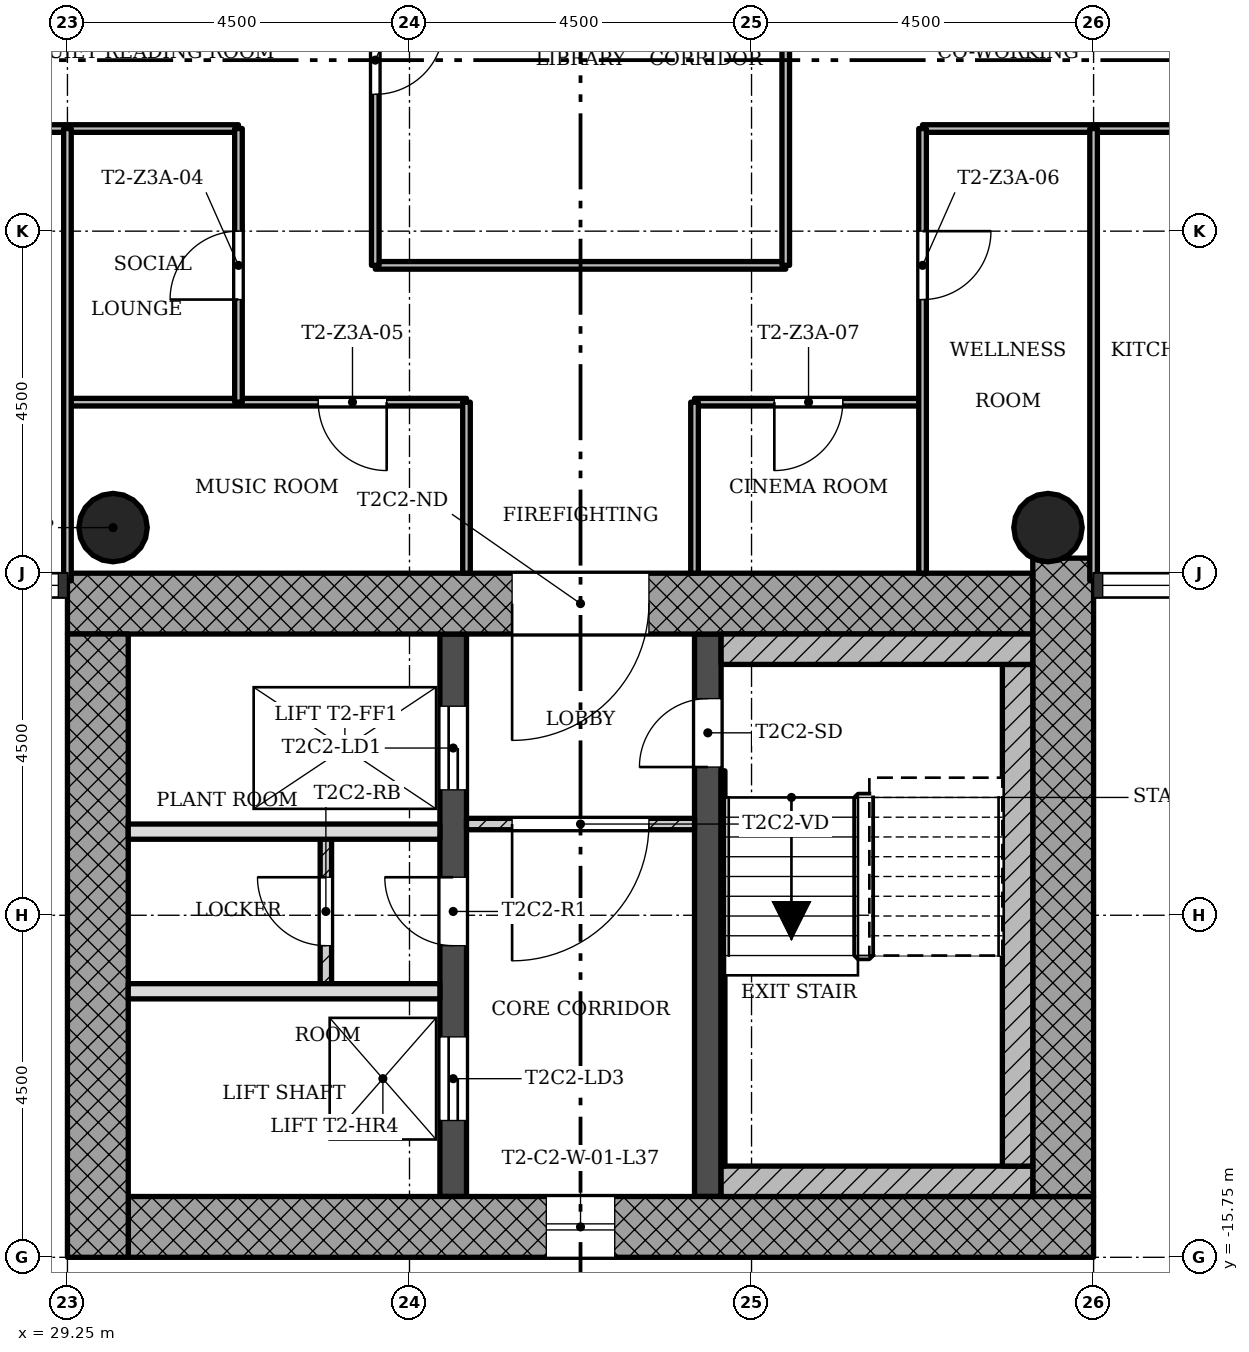
"""IFC4 building model, lengths in metres.
Left out: names, types, materials, properties, quantities, classifications, styles, units other than length and angle.
Written with IfcOpenShell. Run it as: python <this file> out.ifc"""

import sys

from ifc_helpers import new_model, si_unit, direction, frame, frame_2d, origin, origin_2d, place, context, subcontext, project, spatial, rectangle, hollow_circle, extrude, element, fill, save


model = new_model("IFC4")
c1 = context("Model", 3, precision=1e-05, world=origin(), true_north=direction((0.0, 1.0)))
c2 = subcontext(c1, "Body", "Model", "MODEL_VIEW")
j1 = project(units=[si_unit("LENGTHUNIT", "METRE"), si_unit("PLANEANGLEUNIT", "RADIAN")], contexts=[c1])
p1 = place(None, origin())
s1 = spatial("IfcSite", under=j1, at=p1, CompositionType="ELEMENT")
p2 = place(p1, origin())
s2 = spatial("IfcBuilding", under=s1, at=p2, CompositionType="ELEMENT")
p3 = place(p2, frame((0.0, 0.0, 137.1)))
s3 = spatial("IfcBuildingStorey", under=s2, at=p3, CompositionType="ELEMENT", Elevation=137.1)
p4 = place(p3, frame((30.05, -15.35, 0.0), z_axis=(0.0, 0.0, 1.0), x_axis=(1.0, 0.0, 0.0)))
e1 = element("IfcWall", 1, at=p4, inside=s3, PredefinedType="SHEAR", context=c2, shape_type="SweptSolid", body=[
    extrude(rectangle(XDim=12.7, YDim=0.8, at=frame_2d((6.35, 0.0))), origin(), (0.0, 0.0, 1.0), 3.4),
])
p5 = place(p4, frame((5.5, 0.0, 0.45)))
e2 = element("IfcOpeningElement", 2, at=p5, cuts=e1, PredefinedType="OPENING", context=c2, shape_type="SweptSolid", body=[
    extrude(rectangle(XDim=0.9, YDim=2.4, at=frame_2d((0.45, 1.2))), frame((0.0, 0.41, 0.0), z_axis=(0.0, -1.0, 0.0), x_axis=(1.0, 0.0, 0.0)), (0.0, 0.0, 1.0), 0.82),
])
p6 = place(p3, frame((42.35, -14.95, 0.0), z_axis=(0.0, 0.0, 1.0), x_axis=(0.0, 1.0, 0.0)))
e3 = element("IfcWall", 3, at=p6, inside=s3, PredefinedType="SHEAR", context=c2, shape_type="SweptSolid", body=[
    extrude(rectangle(XDim=8.398, YDim=0.8, at=frame_2d((4.199, 0.0))), origin(), (0.0, 0.0, 1.0), 3.4),
])
p7 = place(p3, frame((41.95, -7.15, 0.0), z_axis=(0.0, 0.0, 1.0), x_axis=(-1.0, 0.0, 0.0)))
e4 = element("IfcWall", 4, at=p7, inside=s3, PredefinedType="SHEAR", context=c2, shape_type="SweptSolid", body=[
    extrude(rectangle(XDim=12.7, YDim=0.8, at=frame_2d((6.35, 0.0))), origin(), (0.0, 0.0, 1.0), 3.4),
])
p8 = place(p7, frame((5.05, 0.0, 0.0)))
e5 = element("IfcOpeningElement", 5, at=p8, cuts=e4, PredefinedType="OPENING", context=c2, shape_type="SweptSolid", body=[
    extrude(rectangle(XDim=1.8, YDim=2.1, at=frame_2d((0.9, 1.05))), frame((0.0, 0.41, 0.0), z_axis=(0.0, -1.0, 0.0), x_axis=(1.0, 0.0, 0.0)), (0.0, 0.0, 1.0), 0.82),
])
p9 = place(p3, frame((29.65, -7.55, 0.0), z_axis=(0.0, 0.0, 1.0), x_axis=(0.0, -1.0, 0.0)))
e6 = element("IfcWall", 6, at=p9, inside=s3, PredefinedType="SHEAR", context=c2, shape_type="SweptSolid", body=[
    extrude(rectangle(XDim=8.2, YDim=0.8, at=frame_2d((4.1, 0.0))), origin(), (0.0, 0.0, 1.0), 3.4),
])
p10 = place(p3, frame((34.325, -14.95, 0.0), z_axis=(0.0, 0.0, 1.0), x_axis=(0.0, 1.0, 0.0)))
e7 = element("IfcWall", 7, at=p10, inside=s3, PredefinedType="SHEAR", context=c2, shape_type="SweptSolid", body=[
    extrude(rectangle(XDim=7.4, YDim=0.35, at=frame_2d((3.7, 0.0))), origin(), (0.0, 0.0, 1.0), 3.4),
])
p11 = place(p10, frame((5.35, 0.0, 0.0)))
e8 = element("IfcOpeningElement", 8, at=p11, cuts=e7, PredefinedType="OPENING", context=c2, shape_type="SweptSolid", body=[
    extrude(rectangle(XDim=1.1, YDim=2.1, at=frame_2d((0.55, 1.05))), frame((0.0, 0.185, 0.0), z_axis=(0.0, -1.0, 0.0), x_axis=(1.0, 0.0, 0.0)), (0.0, 0.0, 1.0), 0.37),
])
p12 = place(p10, frame((1.0, 0.0, 0.0)))
e9 = element("IfcOpeningElement", 9, at=p12, cuts=e7, PredefinedType="OPENING", context=c2, shape_type="SweptSolid", body=[
    extrude(rectangle(XDim=1.1, YDim=2.1, at=frame_2d((0.55, 1.05))), frame((0.0, 0.185, 0.0), z_axis=(0.0, -1.0, 0.0), x_axis=(1.0, 0.0, 0.0)), (0.0, 0.0, 1.0), 0.37),
])
p13 = place(p10, frame((3.3, 0.0, 0.0)))
e10 = element("IfcOpeningElement", 10, at=p13, cuts=e7, PredefinedType="OPENING", context=c2, shape_type="SweptSolid", body=[
    extrude(rectangle(XDim=0.9, YDim=2.1, at=frame_2d((0.45, 1.05))), frame((0.0, 0.185, 0.0), z_axis=(0.0, -1.0, 0.0), x_axis=(1.0, 0.0, 0.0)), (0.0, 0.0, 1.0), 0.37),
])
p14 = place(p3, frame((37.675, -14.95, 0.0), z_axis=(0.0, 0.0, 1.0), x_axis=(0.0, 1.0, 0.0)))
e11 = element("IfcWall", 11, at=p14, inside=s3, PredefinedType="SHEAR", context=c2, shape_type="SweptSolid", body=[
    extrude(rectangle(XDim=7.4, YDim=0.35, at=frame_2d((3.7, 0.0))), origin(), (0.0, 0.0, 1.0), 3.4),
])
p15 = place(p14, frame((5.65, 0.0, 0.0)))
e12 = element("IfcOpeningElement", 12, at=p15, cuts=e11, PredefinedType="OPENING", context=c2, shape_type="SweptSolid", body=[
    extrude(rectangle(XDim=0.9, YDim=2.1, at=frame_2d((0.45, 1.05))), frame((0.0, 0.185, 0.0), z_axis=(0.0, -1.0, 0.0), x_axis=(1.0, 0.0, 0.0)), (0.0, 0.0, 1.0), 0.37),
])
for number, where, z_axis, x_axis in (
    (13, (42.15, -6.15, 0.0), (0.0, 0.0, 1.0), (1.0, 0.0, 0.0)),
    (14, (29.85, -6.15, 0.0), (0.0, 0.0, 1.0), (1.0, 0.0, 0.0)),
):
    element("IfcColumn", number, at=place(p3, frame(where, z_axis=z_axis, x_axis=x_axis)), inside=s3, PredefinedType="COLUMN", context=c2, shape_type="SweptSolid", body=[
        extrude(hollow_circle(Radius=0.45, WallThickness=0.032, at=origin_2d()), origin(), (0.0, 0.0, 1.0), 3.4),
    ])
p16 = place(p3, frame((34.5, -10.05, 0.0), z_axis=(0.0, 0.0, 1.0), x_axis=(1.0, 0.0, 0.0)))
e15 = element("IfcWall", 15, at=p16, inside=s3, PredefinedType="PARTITIONING", context=c2, shape_type="SweptSolid", body=[
    extrude(rectangle(XDim=3.0, YDim=0.15, at=frame_2d((1.5, 0.0))), origin(), (0.0, 0.0, 1.0), 3.0),
])
p17 = place(p16, frame((0.6, 0.0, 0.0)))
e16 = element("IfcOpeningElement", 16, at=p17, cuts=e15, PredefinedType="OPENING", context=c2, shape_type="SweptSolid", body=[
    extrude(rectangle(XDim=1.8, YDim=2.1, at=frame_2d((0.9, 1.05))), frame((0.0, 0.085, 0.0), z_axis=(0.0, -1.0, 0.0), x_axis=(1.0, 0.0, 0.0)), (0.0, 0.0, 1.0), 0.17),
])
for number, where, z_axis, x_axis in (
    (17, (30.05, -12.25, 0.0), (0.0, 0.0, 1.0), (1.0, 0.0, 0.0)),
    (18, (30.05, -10.15, 0.0), (0.0, 0.0, 1.0), (1.0, 0.0, 0.0)),
):
    element("IfcWall", number, at=place(p3, frame(where, z_axis=z_axis, x_axis=x_axis)), inside=s3, PredefinedType="SOLIDWALL", context=c2, shape_type="SweptSolid", body=[
        extrude(rectangle(XDim=4.1, YDim=0.2, at=frame_2d((2.05, 0.0))), origin(), (0.0, 0.0, 1.0), 3.0),
    ])
p18 = place(p3, frame((32.65, -10.15, 0.0), z_axis=(0.0, 0.0, 1.0), x_axis=(0.0, -1.0, 0.0)))
e19 = element("IfcWall", 19, at=p18, inside=s3, PredefinedType="PARTITIONING", context=c2, shape_type="SweptSolid", body=[
    extrude(rectangle(XDim=2.1, YDim=0.15, at=frame_2d((1.05, 0.0))), origin(), (0.0, 0.0, 1.0), 3.0),
])
p19 = place(p18, frame((0.6, 0.0, 0.0)))
e20 = element("IfcOpeningElement", 20, at=p19, cuts=e19, PredefinedType="OPENING", context=c2, shape_type="SweptSolid", body=[
    extrude(rectangle(XDim=0.9, YDim=2.1, at=frame_2d((0.45, 1.05))), frame((0.0, 0.085, 0.0), z_axis=(0.0, -1.0, 0.0), x_axis=(1.0, 0.0, 0.0)), (0.0, 0.0, 1.0), 0.17),
])
p20 = place(p3, frame((40.5, -4.5, 0.0), z_axis=(0.0, 0.0, 1.0), x_axis=(-1.0, 0.0, 0.0)))
e21 = element("IfcWall", 21, at=p20, inside=s3, PredefinedType="PARTITIONING", context=c2, shape_type="SweptSolid", body=[
    extrude(rectangle(XDim=3.0, YDim=0.1, at=frame_2d((1.5, 0.0))), origin(), (0.0, 0.0, 1.0), 3.0),
])
p21 = place(p20, frame((1.05, 0.0, 0.0)))
e22 = element("IfcOpeningElement", 22, at=p21, cuts=e21, PredefinedType="OPENING", context=c2, shape_type="SweptSolid", body=[
    extrude(rectangle(XDim=0.9, YDim=2.1, at=frame_2d((0.45, 1.05))), frame((0.0, 0.06, 0.0), z_axis=(0.0, -1.0, 0.0), x_axis=(1.0, 0.0, 0.0)), (0.0, 0.0, 1.0), 0.12),
])
p22 = place(p3, frame((34.5, -4.5, 0.0), z_axis=(0.0, 0.0, 1.0), x_axis=(-1.0, 0.0, 0.0)))
e23 = element("IfcWall", 23, at=p22, inside=s3, PredefinedType="PARTITIONING", context=c2, shape_type="SweptSolid", body=[
    extrude(rectangle(XDim=5.25, YDim=0.1, at=frame_2d((2.625, 0.0))), origin(), (0.0, 0.0, 1.0), 3.0),
])
p23 = place(p22, frame((1.05, 0.0, 0.0)))
e24 = element("IfcOpeningElement", 24, at=p23, cuts=e23, PredefinedType="OPENING", context=c2, shape_type="SweptSolid", body=[
    extrude(rectangle(XDim=0.9, YDim=2.1, at=frame_2d((0.45, 1.05))), frame((0.0, 0.06, 0.0), z_axis=(0.0, -1.0, 0.0), x_axis=(1.0, 0.0, 0.0)), (0.0, 0.0, 1.0), 0.12),
])
p24 = place(p3, frame((38.7, -2.7, 0.0), z_axis=(0.0, 0.0, 1.0), x_axis=(-1.0, 0.0, 0.0)))
e25 = element("IfcWall", 25, at=p24, inside=s3, PredefinedType="PARTITIONING", context=c2, shape_type="SweptSolid", body=[
    extrude(rectangle(XDim=5.4, YDim=0.1, at=frame_2d((2.7, 0.0))), origin(), (0.0, 0.0, 1.0), 3.0),
])
p25 = place(p3, frame((47.25, -0.9, 0.0), z_axis=(0.0, 0.0, 1.0), x_axis=(-1.0, 0.0, 0.0)))
e26 = element("IfcWall", 26, at=p25, inside=s3, PredefinedType="PARTITIONING", context=c2, shape_type="SweptSolid", body=[
    extrude(rectangle(XDim=6.75, YDim=0.1, at=frame_2d((3.375, 0.0))), origin(), (0.0, 0.0, 1.0), 3.0),
])
p26 = place(p25, frame((1.8, 0.0, 0.0)))
e27 = element("IfcOpeningElement", 27, at=p26, cuts=e26, PredefinedType="OPENING", context=c2, shape_type="SweptSolid", body=[
    extrude(rectangle(XDim=0.9, YDim=2.1, at=frame_2d((0.45, 1.05))), frame((0.0, 0.06, 0.0), z_axis=(0.0, -1.0, 0.0), x_axis=(1.0, 0.0, 0.0)), (0.0, 0.0, 1.0), 0.12),
])
p27 = place(p3, frame((31.5, -0.9, 0.0), z_axis=(0.0, 0.0, 1.0), x_axis=(-1.0, 0.0, 0.0)))
e28 = element("IfcWall", 28, at=p27, inside=s3, PredefinedType="PARTITIONING", context=c2, shape_type="SweptSolid", body=[
    extrude(rectangle(XDim=4.05, YDim=0.1, at=frame_2d((2.025, 0.0))), origin(), (0.0, 0.0, 1.0), 3.0),
])
p28 = place(p3, frame((42.75, -6.85, 0.0), z_axis=(0.0, 0.0, 1.0), x_axis=(0.0, 1.0, 0.0)))
e29 = element("IfcWall", 29, at=p28, inside=s3, PredefinedType="PARTITIONING", context=c2, shape_type="SweptSolid", body=[
    extrude(rectangle(XDim=5.95, YDim=0.1, at=frame_2d((2.975, 0.0))), origin(), (0.0, 0.0, 1.0), 3.0),
])
p29 = place(p3, frame((40.5, -6.75, 0.0), z_axis=(0.0, 0.0, 1.0), x_axis=(0.0, 1.0, 0.0)))
e30 = element("IfcWall", 30, at=p29, inside=s3, PredefinedType="PARTITIONING", context=c2, shape_type="SweptSolid", body=[
    extrude(rectangle(XDim=5.85, YDim=0.1, at=frame_2d((2.925, 0.0))), origin(), (0.0, 0.0, 1.0), 3.0),
])
p30 = place(p29, frame((3.6, 0.0, 0.0)))
e31 = element("IfcOpeningElement", 31, at=p30, cuts=e30, PredefinedType="OPENING", context=c2, shape_type="SweptSolid", body=[
    extrude(rectangle(XDim=0.9, YDim=2.1, at=frame_2d((0.45, 1.05))), frame((0.0, 0.06, 0.0), z_axis=(0.0, -1.0, 0.0), x_axis=(1.0, 0.0, 0.0)), (0.0, 0.0, 1.0), 0.12),
])
p31 = place(p3, frame((38.7, -2.7, 0.0), z_axis=(0.0, 0.0, 1.0), x_axis=(0.0, 1.0, 0.0)))
e32 = element("IfcWall", 32, at=p31, inside=s3, PredefinedType="PARTITIONING", context=c2, shape_type="SweptSolid", body=[
    extrude(rectangle(XDim=5.4, YDim=0.1, at=frame_2d((2.7, 0.0))), origin(), (0.0, 0.0, 1.0), 3.0),
])
for number, where, z_axis, x_axis in (
    (33, (37.5, -6.75, 0.0), (0.0, 0.0, 1.0), (0.0, 1.0, 0.0)),
    (34, (34.5, -6.75, 0.0), (0.0, 0.0, 1.0), (0.0, 1.0, 0.0)),
):
    element("IfcWall", number, at=place(p3, frame(where, z_axis=z_axis, x_axis=x_axis)), inside=s3, PredefinedType="PARTITIONING", context=c2, shape_type="SweptSolid", body=[
        extrude(rectangle(XDim=2.25, YDim=0.1, at=frame_2d((1.125, 0.0))), origin(), (0.0, 0.0, 1.0), 3.0),
    ])
p32 = place(p3, frame((33.3, -2.7, 0.0), z_axis=(0.0, 0.0, 1.0), x_axis=(0.0, 1.0, 0.0)))
e35 = element("IfcWall", 35, at=p32, inside=s3, PredefinedType="PARTITIONING", context=c2, shape_type="SweptSolid", body=[
    extrude(rectangle(XDim=5.4, YDim=0.1, at=frame_2d((2.7, 0.0))), origin(), (0.0, 0.0, 1.0), 3.0),
])
p33 = place(p32, frame((2.25, 0.0, 0.0)))
e36 = element("IfcOpeningElement", 36, at=p33, cuts=e35, PredefinedType="OPENING", context=c2, shape_type="SweptSolid", body=[
    extrude(rectangle(XDim=0.9, YDim=2.1, at=frame_2d((0.45, 1.05))), frame((0.0, 0.06, 0.0), z_axis=(0.0, -1.0, 0.0), x_axis=(1.0, 0.0, 0.0)), (0.0, 0.0, 1.0), 0.12),
])
p34 = place(p3, frame((31.5, -4.5, 0.0), z_axis=(0.0, 0.0, 1.0), x_axis=(0.0, 1.0, 0.0)))
e37 = element("IfcWall", 37, at=p34, inside=s3, PredefinedType="PARTITIONING", context=c2, shape_type="SweptSolid", body=[
    extrude(rectangle(XDim=3.6, YDim=0.1, at=frame_2d((1.8, 0.0))), origin(), (0.0, 0.0, 1.0), 3.0),
])
p35 = place(p34, frame((1.35, 0.0, 0.0)))
e38 = element("IfcOpeningElement", 38, at=p35, cuts=e37, PredefinedType="OPENING", context=c2, shape_type="SweptSolid", body=[
    extrude(rectangle(XDim=0.9, YDim=2.1, at=frame_2d((0.45, 1.05))), frame((0.0, 0.06, 0.0), z_axis=(0.0, -1.0, 0.0), x_axis=(1.0, 0.0, 0.0)), (0.0, 0.0, 1.0), 0.12),
])
p36 = place(p3, frame((29.25, -6.85, 0.0), z_axis=(0.0, 0.0, 1.0), x_axis=(0.0, 1.0, 0.0)))
e39 = element("IfcWall", 39, at=p36, inside=s3, PredefinedType="PARTITIONING", context=c2, shape_type="SweptSolid", body=[
    extrude(rectangle(XDim=5.95, YDim=0.1, at=frame_2d((2.975, 0.0))), origin(), (0.0, 0.0, 1.0), 3.0),
])
p37 = place(p3, frame((37.85, -14.75, 0.0), z_axis=(0.0, 0.0, 1.0), x_axis=(1.0, 0.0, 0.0)))
e40 = element("IfcWall", 40, at=p37, inside=s3, PredefinedType="SHEAR", context=c2, shape_type="SweptSolid", body=[
    extrude(rectangle(XDim=4.1, YDim=0.4, at=frame_2d((2.05, 0.0))), origin(), (0.0, 0.0, 1.0), 3.4),
])
p38 = place(p3, frame((41.75, -7.95, 0.0), z_axis=(0.0, 0.0, 1.0), x_axis=(0.0, -1.0, 0.0)))
e41 = element("IfcWall", 41, at=p38, inside=s3, PredefinedType="SHEAR", context=c2, shape_type="SweptSolid", body=[
    extrude(rectangle(XDim=6.6, YDim=0.4, at=frame_2d((3.3, 0.0))), origin(), (0.0, 0.0, 1.0), 3.4),
])
p39 = place(p3, frame((37.85, -7.75, 0.0), z_axis=(0.0, 0.0, 1.0), x_axis=(1.0, 0.0, 0.0)))
e42 = element("IfcWall", 42, at=p39, inside=s3, PredefinedType="SHEAR", context=c2, shape_type="SweptSolid", body=[
    extrude(rectangle(XDim=4.1, YDim=0.4, at=frame_2d((2.05, 0.0))), origin(), (0.0, 0.0, 1.0), 3.4),
])
p40 = place(p3, frame((37.875, -9.35, 0.0), z_axis=(0.0, 0.0, 1.0), x_axis=(0.0, -1.0, 0.0)))
e43 = element("IfcWall", 43, at=p40, inside=s3, PredefinedType="SHEAR", context=c2, shape_type="SweptSolid", body=[
    extrude(rectangle(XDim=5.2, YDim=0.05, at=frame_2d((2.6, 0.0))), origin(), (0.0, 0.0, 1.0), 3.4),
])
p41 = place(p5, origin())
e44 = element("IfcWindow", 44, at=p41, inside=s3, PartitioningType="SINGLE_PANEL", PredefinedType="WINDOW", context=c2, shape_type="SweptSolid", body=[
    extrude(rectangle(XDim=0.9, YDim=2.4, at=frame_2d((0.45, 1.2))), frame((0.0, 0.03, 0.0), z_axis=(0.0, -1.0, 0.0), x_axis=(1.0, 0.0, 0.0)), (0.0, 0.0, 1.0), 0.06),
])
fill(e2, e44)
p42 = place(p17, origin())
e45 = element("IfcDoor", 45, at=p42, inside=s3, OperationType="SINGLE_SWING_LEFT", PredefinedType="DOOR", context=c2, shape_type="SweptSolid", body=[
    extrude(rectangle(XDim=1.8, YDim=2.1, at=frame_2d((0.9, 1.05))), frame((0.0, 0.025, 0.0), z_axis=(0.0, -1.0, 0.0), x_axis=(1.0, 0.0, 0.0)), (0.0, 0.0, 1.0), 0.05),
])
fill(e16, e45)
p43 = place(p19, origin())
e46 = element("IfcDoor", 46, at=p43, inside=s3, OperationType="SINGLE_SWING_LEFT", PredefinedType="DOOR", context=c2, shape_type="SweptSolid", body=[
    extrude(rectangle(XDim=0.9, YDim=2.1, at=frame_2d((0.45, 1.05))), frame((0.0, 0.025, 0.0), z_axis=(0.0, -1.0, 0.0), x_axis=(1.0, 0.0, 0.0)), (0.0, 0.0, 1.0), 0.05),
])
fill(e20, e46)
p44 = place(p33, origin())
e47 = element("IfcDoor", 47, at=p44, inside=s3, OperationType="SINGLE_SWING_RIGHT", PredefinedType="DOOR", context=c2, shape_type="SweptSolid", body=[
    extrude(rectangle(XDim=0.9, YDim=2.1, at=frame_2d((0.45, 1.05))), frame((0.0, 0.025, 0.0), z_axis=(0.0, -1.0, 0.0), x_axis=(1.0, 0.0, 0.0)), (0.0, 0.0, 1.0), 0.05),
])
fill(e36, e47)
p45 = place(p35, origin())
e48 = element("IfcDoor", 48, at=p45, inside=s3, OperationType="SINGLE_SWING_RIGHT", PredefinedType="DOOR", context=c2, shape_type="SweptSolid", body=[
    extrude(rectangle(XDim=0.9, YDim=2.1, at=frame_2d((0.45, 1.05))), frame((0.0, 0.025, 0.0), z_axis=(0.0, -1.0, 0.0), x_axis=(1.0, 0.0, 0.0)), (0.0, 0.0, 1.0), 0.05),
])
fill(e38, e48)
p46 = place(p23, origin())
e49 = element("IfcDoor", 49, at=p46, inside=s3, OperationType="SINGLE_SWING_RIGHT", PredefinedType="DOOR", context=c2, shape_type="SweptSolid", body=[
    extrude(rectangle(XDim=0.9, YDim=2.1, at=frame_2d((0.45, 1.05))), frame((0.0, 0.025, 0.0), z_axis=(0.0, -1.0, 0.0), x_axis=(1.0, 0.0, 0.0)), (0.0, 0.0, 1.0), 0.05),
])
fill(e24, e49)
p47 = place(p30, origin())
e50 = element("IfcDoor", 50, at=p47, inside=s3, OperationType="SINGLE_SWING_RIGHT", PredefinedType="DOOR", context=c2, shape_type="SweptSolid", body=[
    extrude(rectangle(XDim=0.9, YDim=2.1, at=frame_2d((0.45, 1.05))), frame((0.0, 0.025, 0.0), z_axis=(0.0, -1.0, 0.0), x_axis=(1.0, 0.0, 0.0)), (0.0, 0.0, 1.0), 0.05),
])
fill(e31, e50)
p48 = place(p21, origin())
e51 = element("IfcDoor", 51, at=p48, inside=s3, OperationType="SINGLE_SWING_LEFT", PredefinedType="DOOR", context=c2, shape_type="SweptSolid", body=[
    extrude(rectangle(XDim=0.9, YDim=2.1, at=frame_2d((0.45, 1.05))), frame((0.0, 0.025, 0.0), z_axis=(0.0, -1.0, 0.0), x_axis=(1.0, 0.0, 0.0)), (0.0, 0.0, 1.0), 0.05),
])
fill(e22, e51)
p49 = place(p15, origin())
e52 = element("IfcDoor", 52, at=p49, inside=s3, OperationType="SINGLE_SWING_RIGHT", PredefinedType="DOOR", context=c2, shape_type="SweptSolid", body=[
    extrude(rectangle(XDim=0.9, YDim=2.1, at=frame_2d((0.45, 1.05))), frame((0.0, 0.025, 0.0), z_axis=(0.0, -1.0, 0.0), x_axis=(1.0, 0.0, 0.0)), (0.0, 0.0, 1.0), 0.05),
])
fill(e12, e52)
p50 = place(p11, origin())
e53 = element("IfcDoor", 53, at=p50, inside=s3, OperationType="SLIDING_TO_LEFT", PredefinedType="DOOR", context=c2, shape_type="SweptSolid", body=[
    extrude(rectangle(XDim=1.1, YDim=2.1, at=frame_2d((0.55, 1.05))), frame((0.0, 0.025, 0.0), z_axis=(0.0, -1.0, 0.0), x_axis=(1.0, 0.0, 0.0)), (0.0, 0.0, 1.0), 0.05),
])
fill(e8, e53)
p51 = place(p12, origin())
e54 = element("IfcDoor", 54, at=p51, inside=s3, OperationType="SLIDING_TO_LEFT", PredefinedType="DOOR", context=c2, shape_type="SweptSolid", body=[
    extrude(rectangle(XDim=1.1, YDim=2.1, at=frame_2d((0.55, 1.05))), frame((0.0, 0.025, 0.0), z_axis=(0.0, -1.0, 0.0), x_axis=(1.0, 0.0, 0.0)), (0.0, 0.0, 1.0), 0.05),
])
fill(e9, e54)
p52 = place(p13, origin())
e55 = element("IfcDoor", 55, at=p52, inside=s3, OperationType="SINGLE_SWING_LEFT", PredefinedType="DOOR", context=c2, shape_type="SweptSolid", body=[
    extrude(rectangle(XDim=0.9, YDim=2.1, at=frame_2d((0.45, 1.05))), frame((0.0, 0.025, 0.0), z_axis=(0.0, -1.0, 0.0), x_axis=(1.0, 0.0, 0.0)), (0.0, 0.0, 1.0), 0.05),
])
fill(e10, e55)
p53 = place(p8, origin())
e56 = element("IfcDoor", 56, at=p53, inside=s3, OperationType="SINGLE_SWING_LEFT", PredefinedType="DOOR", context=c2, shape_type="SweptSolid", body=[
    extrude(rectangle(XDim=1.8, YDim=2.1, at=frame_2d((0.9, 1.05))), frame((0.0, 0.025, 0.0), z_axis=(0.0, -1.0, 0.0), x_axis=(1.0, 0.0, 0.0)), (0.0, 0.0, 1.0), 0.05),
])
fill(e5, e56)
save(model, sys.argv[1])
